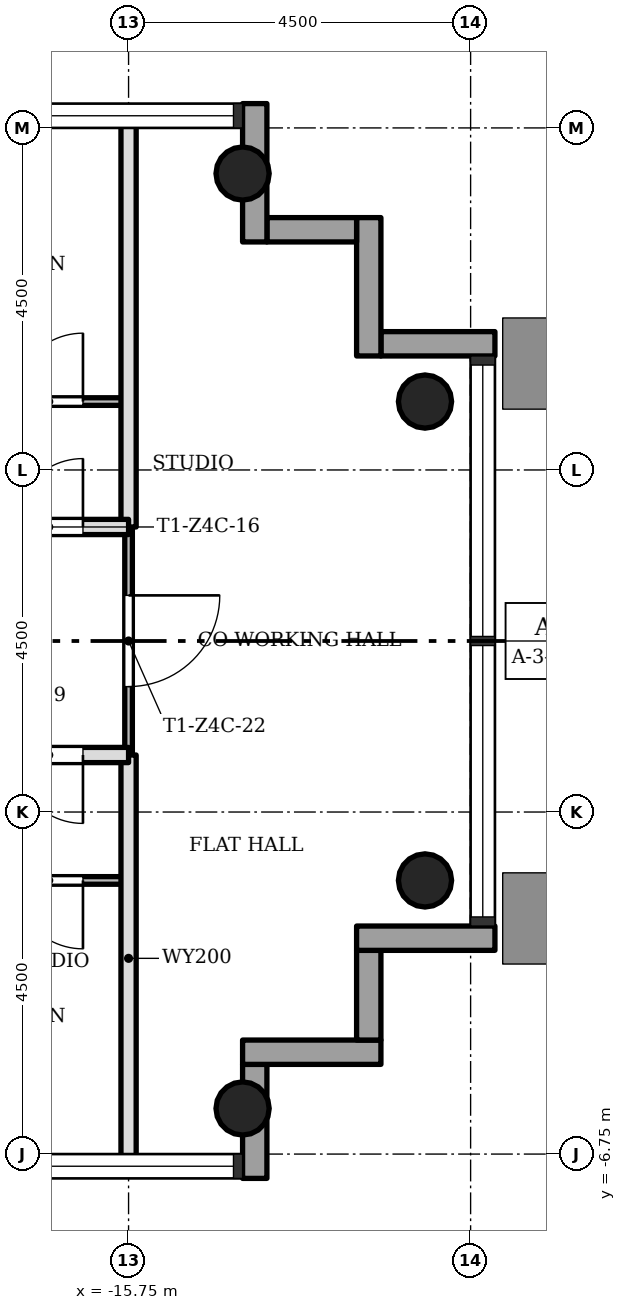
"""IFC4 building model, lengths in metres.
Left out: names, types, materials, properties, quantities, classifications, styles, units other than length and angle.
Written with IfcOpenShell. Run it as: python <this file> out.ifc"""

import sys

from ifc_helpers import new_model, si_unit, direction, frame, frame_2d, origin, origin_2d, place, context, subcontext, project, spatial, rectangle, hollow_circle, extrude, element, fill, save


model = new_model("IFC4")
c1 = context("Model", 3, precision=1e-05, world=origin(), true_north=direction((0.0, 1.0)))
c2 = subcontext(c1, "Body", "Model", "MODEL_VIEW")
j1 = project(units=[si_unit("LENGTHUNIT", "METRE"), si_unit("PLANEANGLEUNIT", "RADIAN")], contexts=[c1])
p1 = place(None, origin())
s1 = spatial("IfcSite", under=j1, at=p1, CompositionType="ELEMENT")
p2 = place(p1, origin())
s2 = spatial("IfcBuilding", under=s1, at=p2, CompositionType="ELEMENT")
p3 = place(p2, frame((0.0, 0.0, 189.2)))
s3 = spatial("IfcBuildingStorey", under=s2, at=p3, CompositionType="ELEMENT", Elevation=189.2)
for number, where, z_axis, x_axis in (
    (1, (-14.25, -6.15, 0.0), (0.0, 0.0, 1.0), (1.0, 0.0, 0.0)),
    (2, (-14.25, 6.15, 0.0), (0.0, 0.0, 1.0), (1.0, 0.0, 0.0)),
    (3, (-11.85, -3.15, 0.0), (0.0, 0.0, 1.0), (1.0, 0.0, 0.0)),
    (4, (-11.85, 3.15, 0.0), (0.0, 0.0, 1.0), (1.0, 0.0, 0.0)),
):
    element("IfcColumn", number, at=place(p3, frame(where, z_axis=z_axis, x_axis=x_axis)), inside=s3, PredefinedType="COLUMN", context=c2, shape_type="SweptSolid", body=[
        extrude(hollow_circle(Radius=0.35, WallThickness=0.025, at=origin_2d()), origin(), (0.0, 0.0, 1.0), 3.4),
    ])
p4 = place(p3, frame((-14.09, -7.07, -0.3), z_axis=(0.0, 0.0, 1.0), x_axis=(0.0, 1.0, 0.0)))
e5 = element("IfcWall", 5, at=p4, inside=s3, PredefinedType="STANDARD", context=c2, shape_type="SweptSolid", body=[
    extrude(rectangle(XDim=1.5, YDim=0.32, at=frame_2d((0.75, 0.0))), origin(), (0.0, 0.0, 1.0), 3.4),
])
p5 = place(p3, frame((-14.25, -5.41, -0.3), z_axis=(0.0, 0.0, 1.0), x_axis=(1.0, 0.0, 0.0)))
e6 = element("IfcWall", 6, at=p5, inside=s3, PredefinedType="STANDARD", context=c2, shape_type="SweptSolid", body=[
    extrude(rectangle(XDim=1.82, YDim=0.32, at=frame_2d((0.91, 0.0))), origin(), (0.0, 0.0, 1.0), 3.4),
])
p6 = place(p3, frame((-12.59, -5.25, -0.3), z_axis=(0.0, 0.0, 1.0), x_axis=(0.0, 1.0, 0.0)))
e7 = element("IfcWall", 7, at=p6, inside=s3, PredefinedType="STANDARD", context=c2, shape_type="SweptSolid", body=[
    extrude(rectangle(XDim=1.18, YDim=0.32, at=frame_2d((0.59, 0.0))), origin(), (0.0, 0.0, 1.0), 3.4),
])
p7 = place(p3, frame((-12.75, -3.91, -0.3), z_axis=(0.0, 0.0, 1.0), x_axis=(1.0, 0.0, 0.0)))
e8 = element("IfcWall", 8, at=p7, inside=s3, PredefinedType="STANDARD", context=c2, shape_type="SweptSolid", body=[
    extrude(rectangle(XDim=1.82, YDim=0.32, at=frame_2d((0.91, 0.0))), origin(), (0.0, 0.0, 1.0), 3.4),
])
p8 = place(p3, frame((-10.93, 3.91, -0.3), z_axis=(0.0, 0.0, 1.0), x_axis=(-1.0, 0.0, 0.0)))
e9 = element("IfcWall", 9, at=p8, inside=s3, PredefinedType="STANDARD", context=c2, shape_type="SweptSolid", body=[
    extrude(rectangle(XDim=1.5, YDim=0.32, at=frame_2d((0.75, 0.0))), origin(), (0.0, 0.0, 1.0), 3.4),
])
p9 = place(p3, frame((-12.59, 3.75, -0.3), z_axis=(0.0, 0.0, 1.0), x_axis=(0.0, 1.0, 0.0)))
e10 = element("IfcWall", 10, at=p9, inside=s3, PredefinedType="STANDARD", context=c2, shape_type="SweptSolid", body=[
    extrude(rectangle(XDim=1.82, YDim=0.32, at=frame_2d((0.91, 0.0))), origin(), (0.0, 0.0, 1.0), 3.4),
])
p10 = place(p3, frame((-12.75, 5.41, -0.3), z_axis=(0.0, 0.0, 1.0), x_axis=(-1.0, 0.0, 0.0)))
e11 = element("IfcWall", 11, at=p10, inside=s3, PredefinedType="STANDARD", context=c2, shape_type="SweptSolid", body=[
    extrude(rectangle(XDim=1.18, YDim=0.32, at=frame_2d((0.59, 0.0))), origin(), (0.0, 0.0, 1.0), 3.4),
])
p11 = place(p3, frame((-14.09, 5.25, -0.3), z_axis=(0.0, 0.0, 1.0), x_axis=(0.0, 1.0, 0.0)))
e12 = element("IfcWall", 12, at=p11, inside=s3, PredefinedType="STANDARD", context=c2, shape_type="SweptSolid", body=[
    extrude(rectangle(XDim=1.82, YDim=0.32, at=frame_2d((0.91, 0.0))), origin(), (0.0, 0.0, 1.0), 3.4),
])
p12 = place(p3, frame((-15.75, -1.5, 0.0), z_axis=(0.0, 0.0, 1.0), x_axis=(0.0, 1.0, 0.0)))
e13 = element("IfcWall", 13, at=p12, inside=s3, PredefinedType="PARTITIONING", context=c2, shape_type="SweptSolid", body=[
    extrude(rectangle(XDim=3.0, YDim=0.1, at=frame_2d((1.5, 0.0))), origin(), (0.0, 0.0, 1.0), 3.0),
])
p13 = place(p12, frame((0.9, 0.0, 0.0)))
e14 = element("IfcOpeningElement", 14, at=p13, cuts=e13, PredefinedType="OPENING", context=c2, shape_type="SweptSolid", body=[
    extrude(rectangle(XDim=1.2, YDim=2.1, at=frame_2d((0.6, 1.05))), frame((0.0, 0.06, 0.0), z_axis=(0.0, -1.0, 0.0), x_axis=(1.0, 0.0, 0.0)), (0.0, 0.0, 1.0), 0.12),
])
for number, where, z_axis, x_axis in (
    (15, (-15.75, -6.85, 0.0), (0.0, 0.0, 1.0), (0.0, 1.0, 0.0)),
    (16, (-15.75, 1.5, 0.0), (0.0, 0.0, 1.0), (0.0, 1.0, 0.0)),
):
    element("IfcWall", number, at=place(p3, frame(where, z_axis=z_axis, x_axis=x_axis)), inside=s3, PredefinedType="SOLIDWALL", context=c2, shape_type="SweptSolid", body=[
        extrude(rectangle(XDim=5.35, YDim=0.2, at=frame_2d((2.675, 0.0))), origin(), (0.0, 0.0, 1.0), 3.0),
    ])
p14 = place(p3, frame((-20.25, -3.15, 0.0), z_axis=(0.0, 0.0, 1.0), x_axis=(1.0, 0.0, 0.0)))
e17 = element("IfcWall", 17, at=p14, inside=s3, PredefinedType="PARTITIONING", context=c2, shape_type="SweptSolid", body=[
    extrude(rectangle(XDim=4.5, YDim=0.1, at=frame_2d((2.25, 0.0))), origin(), (0.0, 0.0, 1.0), 3.0),
])
p15 = place(p14, frame((3.0, 0.0, 0.0)))
e18 = element("IfcOpeningElement", 18, at=p15, cuts=e17, PredefinedType="OPENING", context=c2, shape_type="SweptSolid", body=[
    extrude(rectangle(XDim=0.9, YDim=2.1, at=frame_2d((0.45, 1.05))), frame((0.0, 0.06, 0.0), z_axis=(0.0, -1.0, 0.0), x_axis=(1.0, 0.0, 0.0)), (0.0, 0.0, 1.0), 0.12),
])
p16 = place(p3, frame((-20.25, -1.5, 0.0), z_axis=(0.0, 0.0, 1.0), x_axis=(1.0, 0.0, 0.0)))
e19 = element("IfcWall", 19, at=p16, inside=s3, PredefinedType="SOLIDWALL", context=c2, shape_type="SweptSolid", body=[
    extrude(rectangle(XDim=4.5, YDim=0.2, at=frame_2d((2.25, 0.0))), origin(), (0.0, 0.0, 1.0), 3.0),
])
p17 = place(p16, frame((3.0, 0.0, 0.0)))
e20 = element("IfcOpeningElement", 20, at=p17, cuts=e19, PredefinedType="OPENING", context=c2, shape_type="SweptSolid", body=[
    extrude(rectangle(XDim=0.9, YDim=2.1, at=frame_2d((0.45, 1.05))), frame((0.0, 0.11, 0.0), z_axis=(0.0, -1.0, 0.0), x_axis=(1.0, 0.0, 0.0)), (0.0, 0.0, 1.0), 0.22),
])
p18 = place(p3, frame((-20.25, 1.5, 0.0), z_axis=(0.0, 0.0, 1.0), x_axis=(1.0, 0.0, 0.0)))
e21 = element("IfcWall", 21, at=p18, inside=s3, PredefinedType="SOLIDWALL", context=c2, shape_type="SweptSolid", body=[
    extrude(rectangle(XDim=4.5, YDim=0.2, at=frame_2d((2.25, 0.0))), origin(), (0.0, 0.0, 1.0), 3.0),
])
p19 = place(p18, frame((3.0, 0.0, 0.0)))
e22 = element("IfcOpeningElement", 22, at=p19, cuts=e21, PredefinedType="OPENING", context=c2, shape_type="SweptSolid", body=[
    extrude(rectangle(XDim=0.9, YDim=2.1, at=frame_2d((0.45, 1.05))), frame((0.0, 0.11, 0.0), z_axis=(0.0, -1.0, 0.0), x_axis=(1.0, 0.0, 0.0)), (0.0, 0.0, 1.0), 0.22),
])
p20 = place(p3, frame((-20.25, 3.15, 0.0), z_axis=(0.0, 0.0, 1.0), x_axis=(1.0, 0.0, 0.0)))
e23 = element("IfcWall", 23, at=p20, inside=s3, PredefinedType="PARTITIONING", context=c2, shape_type="SweptSolid", body=[
    extrude(rectangle(XDim=4.5, YDim=0.1, at=frame_2d((2.25, 0.0))), origin(), (0.0, 0.0, 1.0), 3.0),
])
p21 = place(p20, frame((3.0, 0.0, 0.0)))
e24 = element("IfcOpeningElement", 24, at=p21, cuts=e23, PredefinedType="OPENING", context=c2, shape_type="SweptSolid", body=[
    extrude(rectangle(XDim=0.9, YDim=2.1, at=frame_2d((0.45, 1.05))), frame((0.0, 0.06, 0.0), z_axis=(0.0, -1.0, 0.0), x_axis=(1.0, 0.0, 0.0)), (0.0, 0.0, 1.0), 0.12),
])
p22 = place(p19, origin())
e25 = element("IfcDoor", 25, at=p22, inside=s3, OperationType="SINGLE_SWING_LEFT", PredefinedType="DOOR", context=c2, shape_type="SweptSolid", body=[
    extrude(rectangle(XDim=0.9, YDim=2.1, at=frame_2d((0.45, 1.05))), frame((0.0, 0.025, 0.0), z_axis=(0.0, -1.0, 0.0), x_axis=(1.0, 0.0, 0.0)), (0.0, 0.0, 1.0), 0.05),
])
fill(e22, e25)
p23 = place(p21, origin())
e26 = element("IfcDoor", 26, at=p23, inside=s3, OperationType="SINGLE_SWING_LEFT", PredefinedType="DOOR", context=c2, shape_type="SweptSolid", body=[
    extrude(rectangle(XDim=0.9, YDim=2.1, at=frame_2d((0.45, 1.05))), frame((0.0, 0.025, 0.0), z_axis=(0.0, -1.0, 0.0), x_axis=(1.0, 0.0, 0.0)), (0.0, 0.0, 1.0), 0.05),
])
fill(e24, e26)
p24 = place(p17, origin())
e27 = element("IfcDoor", 27, at=p24, inside=s3, OperationType="SINGLE_SWING_RIGHT", PredefinedType="DOOR", context=c2, shape_type="SweptSolid", body=[
    extrude(rectangle(XDim=0.9, YDim=2.1, at=frame_2d((0.45, 1.05))), frame((0.0, 0.025, 0.0), z_axis=(0.0, -1.0, 0.0), x_axis=(1.0, 0.0, 0.0)), (0.0, 0.0, 1.0), 0.05),
])
fill(e20, e27)
p25 = place(p15, origin())
e28 = element("IfcDoor", 28, at=p25, inside=s3, OperationType="SINGLE_SWING_RIGHT", PredefinedType="DOOR", context=c2, shape_type="SweptSolid", body=[
    extrude(rectangle(XDim=0.9, YDim=2.1, at=frame_2d((0.45, 1.05))), frame((0.0, 0.025, 0.0), z_axis=(0.0, -1.0, 0.0), x_axis=(1.0, 0.0, 0.0)), (0.0, 0.0, 1.0), 0.05),
])
fill(e18, e28)
p26 = place(p13, origin())
e29 = element("IfcDoor", 29, at=p26, inside=s3, OperationType="SINGLE_SWING_RIGHT", PredefinedType="DOOR", context=c2, shape_type="SweptSolid", body=[
    extrude(rectangle(XDim=1.2, YDim=2.1, at=frame_2d((0.6, 1.05))), frame((0.0, 0.025, 0.0), z_axis=(0.0, -1.0, 0.0), x_axis=(1.0, 0.0, 0.0)), (0.0, 0.0, 1.0), 0.05),
])
fill(e14, e29)
save(model, sys.argv[1])
